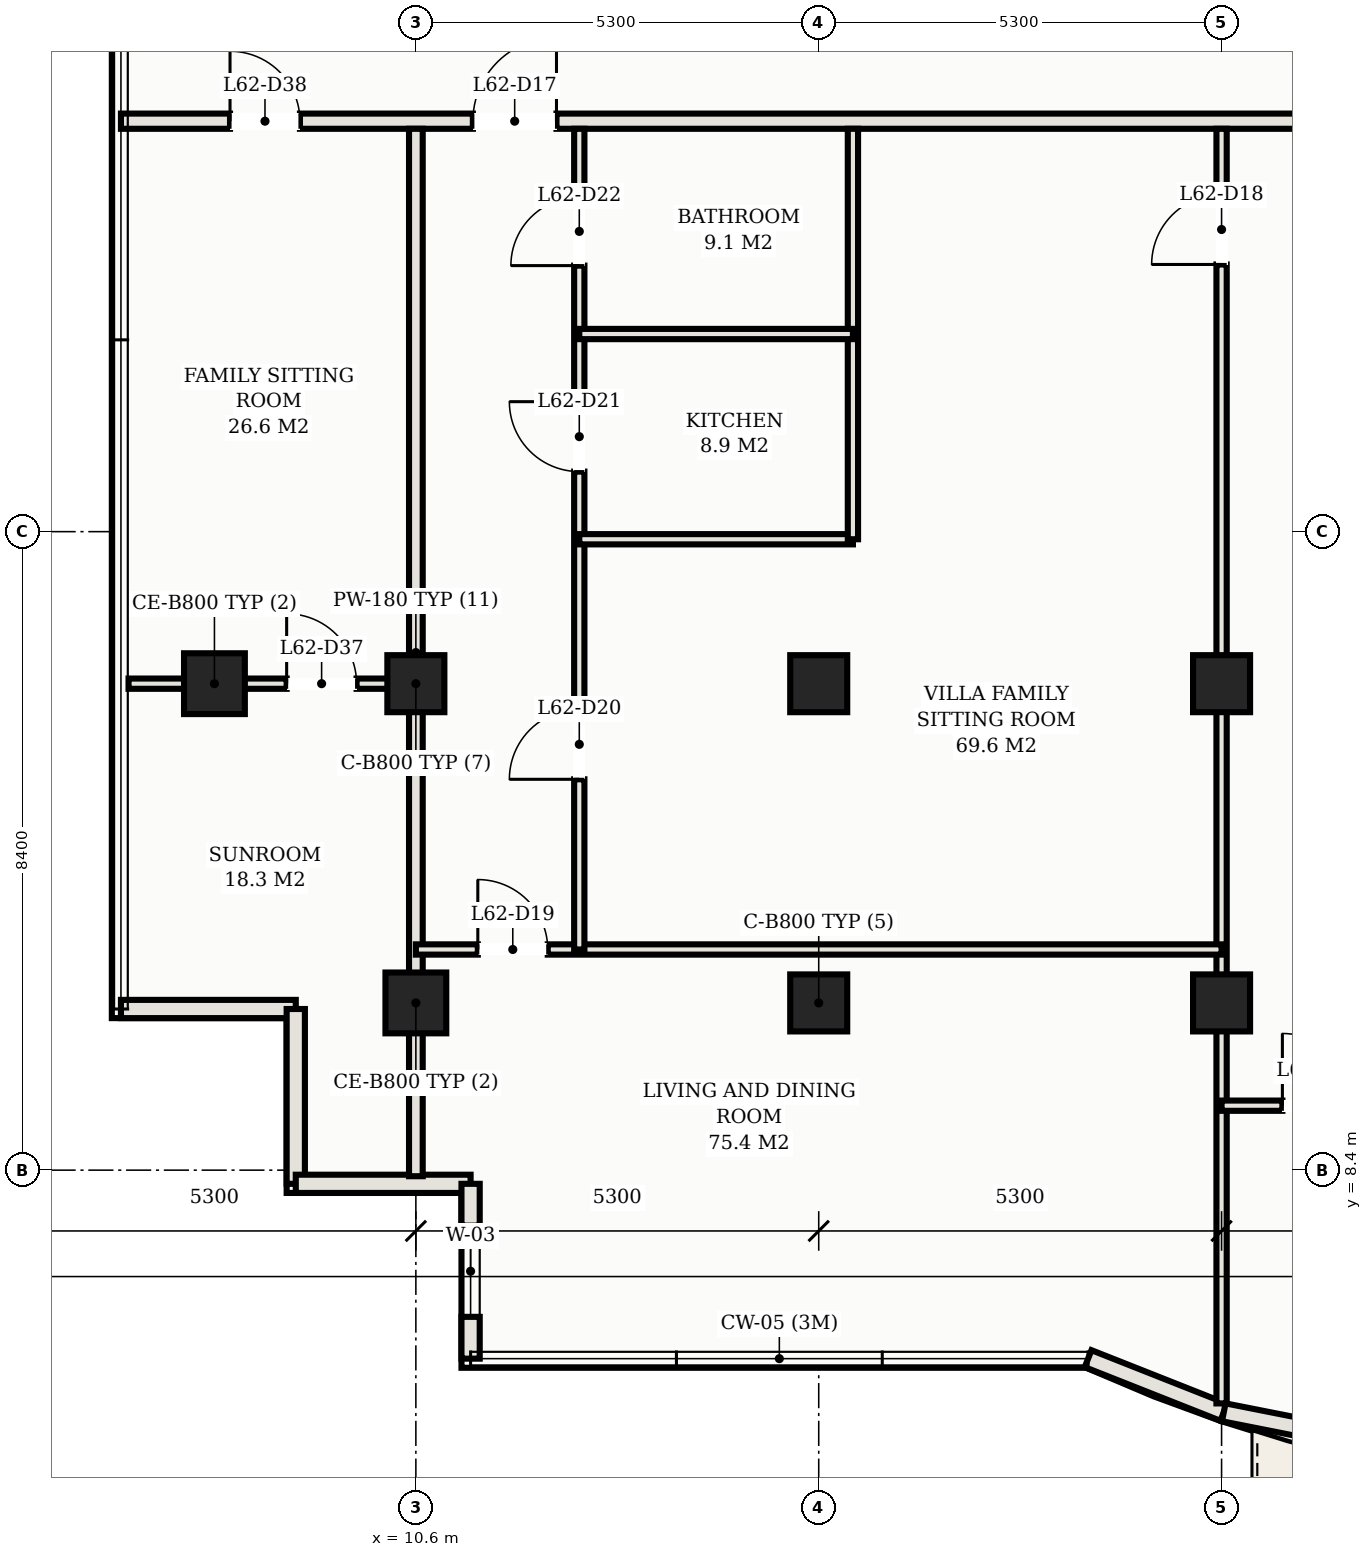
"""IFC4 building model, lengths in metres.
Left out: names, types, materials, properties, quantities, classifications, styles, units other than length and angle.
Written with IfcOpenShell. Run it as: python <this file> out.ifc"""

import sys

from ifc_helpers import new_model, si_unit, direction, frame, frame_2d, origin, origin_2d, place, context, subcontext, project, spatial, rectangle, hollow_rectangle, extrude, element, fill, save


model = new_model("IFC4")
c1 = context("Model", 3, precision=1e-05, world=origin(), true_north=direction((0.0, 1.0)))
c2 = subcontext(c1, "Body", "Model", "MODEL_VIEW")
j1 = project(units=[si_unit("LENGTHUNIT", "METRE"), si_unit("PLANEANGLEUNIT", "RADIAN")], contexts=[c1])
p1 = place(None, origin())
s1 = spatial("IfcSite", under=j1, at=p1, CompositionType="ELEMENT")
p2 = place(p1, origin())
s2 = spatial("IfcBuilding", under=s1, at=p2, CompositionType="ELEMENT")
p3 = place(p2, frame((0.0, 0.0, 226.4)))
s3 = spatial("IfcBuildingStorey", under=s2, at=p3, CompositionType="ELEMENT", Elevation=226.4)
p4 = place(p3, frame((10.6, 14.8, 0.0), z_axis=(0.0, 0.0, 1.0), x_axis=(1.0, 0.0, 0.0)))
e1 = element("IfcColumn", 1, at=p4, inside=s3, PredefinedType="COLUMN", context=c2, shape_type="SweptSolid", body=[
    extrude(hollow_rectangle(XDim=0.75, YDim=0.75, WallThickness=0.025, at=origin_2d()), origin(), (0.0, 0.0, 1.0), 3.3),
])
p5 = place(p3, frame((10.6, 10.6, 0.0), z_axis=(0.0, 0.0, 1.0), x_axis=(1.0, 0.0, 0.0)))
e2 = element("IfcColumn", 2, at=p5, inside=s3, PredefinedType="COLUMN", context=c2, shape_type="SweptSolid", body=[
    extrude(hollow_rectangle(XDim=0.8, YDim=0.8, WallThickness=0.028, at=origin_2d()), origin(), (0.0, 0.0, 1.0), 3.3),
])
for number, where, z_axis, x_axis in (
    (3, (15.9, 14.8, 0.0), (0.0, 0.0, 1.0), (1.0, 0.0, 0.0)),
    (4, (15.9, 10.6, 0.0), (0.0, 0.0, 1.0), (1.0, 0.0, 0.0)),
    (5, (21.2, 14.8, 0.0), (0.0, 0.0, 1.0), (1.0, 0.0, 0.0)),
    (6, (21.2, 10.6, 0.0), (0.0, 0.0, 1.0), (1.0, 0.0, 0.0)),
):
    element("IfcColumn", number, at=place(p3, frame(where, z_axis=z_axis, x_axis=x_axis)), inside=s3, PredefinedType="COLUMN", context=c2, shape_type="SweptSolid", body=[
        extrude(hollow_rectangle(XDim=0.75, YDim=0.75, WallThickness=0.025, at=origin_2d()), origin(), (0.0, 0.0, 1.0), 3.3),
    ])
p6 = place(p3, frame((7.95, 14.8, 0.0), z_axis=(0.0, 0.0, 1.0), x_axis=(1.0, 0.0, 0.0)))
e7 = element("IfcColumn", 7, at=p6, inside=s3, PredefinedType="COLUMN", context=c2, shape_type="SweptSolid", body=[
    extrude(hollow_rectangle(XDim=0.8, YDim=0.8, WallThickness=0.028, at=origin_2d()), origin(), (0.0, 0.0, 1.0), 3.3),
])
for number, where, z_axis, x_axis in (
    (8, (6.72, 10.52, 0.0), (0.0, 0.0, 1.0), (1.0, 0.0, 0.0)),
    (9, (9.02, 10.52, 0.0), (0.0, 0.0, 1.0), (0.0, -1.0, 0.0)),
    (10, (9.02, 8.22, 0.0), (0.0, 0.0, 1.0), (1.0, 0.0, 0.0)),
):
    element("IfcWall", number, at=place(p3, frame(where, z_axis=z_axis, x_axis=x_axis)), inside=s3, PredefinedType="SOLIDWALL", context=c2, shape_type="SweptSolid", body=[
        extrude(rectangle(XDim=2.3, YDim=0.24, at=frame_2d((1.15, 0.0))), origin(), (0.0, 0.0, 1.0), 3.11),
    ])
p7 = place(p3, frame((11.32, 8.22, 0.0), z_axis=(0.0, 0.0, 1.0), x_axis=(0.0, -1.0, 0.0)))
e11 = element("IfcWall", 11, at=p7, inside=s3, PredefinedType="SOLIDWALL", context=c2, shape_type="SweptSolid", body=[
    extrude(rectangle(XDim=2.3, YDim=0.24, at=frame_2d((1.15, 0.0))), origin(), (0.0, 0.0, 1.0), 3.11),
])
p8 = place(p7, frame((0.55, 0.0, 0.75)))
e12 = element("IfcOpeningElement", 12, at=p8, cuts=e11, PredefinedType="OPENING", context=c2, shape_type="SweptSolid", body=[
    extrude(rectangle(XDim=1.2, YDim=1.5, at=frame_2d((0.6, 0.75))), frame((0.0, 0.13, 0.0), z_axis=(0.0, -1.0, 0.0), x_axis=(1.0, 0.0, 0.0)), (0.0, 0.0, 1.0), 0.26),
])
p9 = place(p3, frame((19.444, 5.92, 0.0), z_axis=(0.0, 0.0, 1.0), x_axis=(0.92993442177, -0.367725401906, 0.0)))
e13 = element("IfcWall", 13, at=p9, inside=s3, PredefinedType="SOLIDWALL", context=c2, shape_type="SweptSolid", body=[
    extrude(rectangle(XDim=1.919, YDim=0.24, at=frame_2d((0.96, 0.0))), origin(), (0.0, 0.0, 1.0), 3.11),
])
p10 = place(p3, frame((21.229, 5.214, 0.0), z_axis=(0.0, 0.0, 1.0), x_axis=(0.980985349685, -0.194081796425, 0.0)))
e14 = element("IfcWall", 14, at=p10, inside=s3, PredefinedType="SOLIDWALL", context=c2, shape_type="SweptSolid", body=[
    extrude(rectangle(XDim=4.478, YDim=0.24, at=frame_2d((2.239, 0.0))), origin(), (0.0, 0.0, 1.0), 3.11),
])
p11 = place(p10, frame((1.473, 0.0, 0.0)))
e15 = element("IfcOpeningElement", 15, at=p11, cuts=e14, PredefinedType="OPENING", context=c2, shape_type="SweptSolid", body=[
    extrude(rectangle(XDim=1.8, YDim=2.2, at=frame_2d((0.9, 1.1))), frame((0.0, 0.13, 0.0), z_axis=(0.0, -1.0, 0.0), x_axis=(1.0, 0.0, 0.0)), (0.0, 0.0, 1.0), 0.26),
])
p12 = place(p3, frame((6.72, 22.2, 0.0), z_axis=(0.0, 0.0, 1.0), x_axis=(1.0, 0.0, 0.0)))
e16 = element("IfcWall", 16, at=p12, inside=s3, PredefinedType="PARTITIONING", context=c2, shape_type="SweptSolid", body=[
    extrude(rectangle(XDim=39.56, YDim=0.2, at=frame_2d((19.78, 0.0))), origin(), (0.0, 0.0, 1.0), 2.43),
])
p13 = place(p12, frame((4.63, 0.0, 0.0)))
e17 = element("IfcOpeningElement", 17, at=p13, cuts=e16, PredefinedType="OPENING", context=c2, shape_type="SweptSolid", body=[
    extrude(rectangle(XDim=1.1, YDim=2.25, at=frame_2d((0.55, 1.125))), frame((0.0, 0.11, 0.0), z_axis=(0.0, -1.0, 0.0), x_axis=(1.0, 0.0, 0.0)), (0.0, 0.0, 1.0), 0.22),
])
p14 = place(p12, frame((20.53, 0.0, 0.0)))
e18 = element("IfcOpeningElement", 18, at=p14, cuts=e16, PredefinedType="OPENING", context=c2, shape_type="SweptSolid", body=[
    extrude(rectangle(XDim=1.1, YDim=2.25, at=frame_2d((0.55, 1.125))), frame((0.0, 0.11, 0.0), z_axis=(0.0, -1.0, 0.0), x_axis=(1.0, 0.0, 0.0)), (0.0, 0.0, 1.0), 0.22),
])
p15 = place(p12, frame((1.435, 0.0, 0.0)))
e19 = element("IfcOpeningElement", 19, at=p15, cuts=e16, PredefinedType="OPENING", context=c2, shape_type="SweptSolid", body=[
    extrude(rectangle(XDim=0.92, YDim=2.15, at=frame_2d((0.46, 1.075))), frame((0.0, 0.11, 0.0), z_axis=(0.0, -1.0, 0.0), x_axis=(1.0, 0.0, 0.0)), (0.0, 0.0, 1.0), 0.22),
])
p16 = place(p12, frame((37.205, 0.0, 0.0)))
e20 = element("IfcOpeningElement", 20, at=p16, cuts=e16, PredefinedType="OPENING", context=c2, shape_type="SweptSolid", body=[
    extrude(rectangle(XDim=0.92, YDim=2.15, at=frame_2d((0.46, 1.075))), frame((0.0, 0.11, 0.0), z_axis=(0.0, -1.0, 0.0), x_axis=(1.0, 0.0, 0.0)), (0.0, 0.0, 1.0), 0.22),
])
p17 = place(p3, frame((10.6, 8.32, 0.0), z_axis=(0.0, 0.0, 1.0), x_axis=(0.0, 1.0, 0.0)))
e21 = element("IfcWall", 21, at=p17, inside=s3, PredefinedType="PARTITIONING", context=c2, shape_type="SweptSolid", body=[
    extrude(rectangle(XDim=13.78, YDim=0.18, at=frame_2d((6.89, 0.0))), origin(), (0.0, 0.0, 1.0), 2.43),
])
p18 = place(p3, frame((21.2, 5.331, 0.0), z_axis=(0.0, 0.0, 1.0), x_axis=(0.0, 1.0, 0.0)))
e22 = element("IfcWall", 22, at=p18, inside=s3, PredefinedType="PARTITIONING", context=c2, shape_type="SweptSolid", body=[
    extrude(rectangle(XDim=16.769, YDim=0.135, at=frame_2d((8.385, 0.0))), origin(), (0.0, 0.0, 1.0), 2.43),
])
p19 = place(p18, frame((14.984, 0.0, 0.0)))
e23 = element("IfcOpeningElement", 23, at=p19, cuts=e22, PredefinedType="OPENING", context=c2, shape_type="SweptSolid", body=[
    extrude(rectangle(XDim=0.92, YDim=2.15, at=frame_2d((0.46, 1.075))), frame((0.0, 0.078, 0.0), z_axis=(0.0, -1.0, 0.0), x_axis=(1.0, 0.0, 0.0)), (0.0, 0.0, 1.0), 0.155),
])
p20 = place(p3, frame((10.6, 11.303, 0.0), z_axis=(0.0, 0.0, 1.0), x_axis=(1.0, 0.0, 0.0)))
e24 = element("IfcWall", 24, at=p20, inside=s3, PredefinedType="PARTITIONING", context=c2, shape_type="SweptSolid", body=[
    extrude(rectangle(XDim=10.6, YDim=0.135, at=frame_2d((5.3, 0.0))), origin(), (0.0, 0.0, 1.0), 2.43),
])
p21 = place(p20, frame((0.815, 0.0, 0.0)))
e25 = element("IfcOpeningElement", 25, at=p21, cuts=e24, PredefinedType="OPENING", context=c2, shape_type="SweptSolid", body=[
    extrude(rectangle(XDim=0.92, YDim=2.15, at=frame_2d((0.46, 1.075))), frame((0.0, 0.078, 0.0), z_axis=(0.0, -1.0, 0.0), x_axis=(1.0, 0.0, 0.0)), (0.0, 0.0, 1.0), 0.155),
])
p22 = place(p3, frame((12.75, 11.303, 0.0), z_axis=(0.0, 0.0, 1.0), x_axis=(0.0, 1.0, 0.0)))
e26 = element("IfcWall", 26, at=p22, inside=s3, PredefinedType="PARTITIONING", context=c2, shape_type="SweptSolid", body=[
    extrude(rectangle(XDim=10.797, YDim=0.135, at=frame_2d((5.398, 0.0))), origin(), (0.0, 0.0, 1.0), 2.43),
])
p23 = place(p22, frame((2.239, 0.0, 0.0)))
e27 = element("IfcOpeningElement", 27, at=p23, cuts=e26, PredefinedType="OPENING", context=c2, shape_type="SweptSolid", body=[
    extrude(rectangle(XDim=0.92, YDim=2.15, at=frame_2d((0.46, 1.075))), frame((0.0, 0.078, 0.0), z_axis=(0.0, -1.0, 0.0), x_axis=(1.0, 0.0, 0.0)), (0.0, 0.0, 1.0), 0.155),
])
p24 = place(p22, frame((6.287, 0.0, 0.0)))
e28 = element("IfcOpeningElement", 28, at=p24, cuts=e26, PredefinedType="OPENING", context=c2, shape_type="SweptSolid", body=[
    extrude(rectangle(XDim=0.92, YDim=2.15, at=frame_2d((0.46, 1.075))), frame((0.0, 0.078, 0.0), z_axis=(0.0, -1.0, 0.0), x_axis=(1.0, 0.0, 0.0)), (0.0, 0.0, 1.0), 0.155),
])
p25 = place(p22, frame((8.997, 0.0, 0.0)))
e29 = element("IfcOpeningElement", 29, at=p25, cuts=e26, PredefinedType="OPENING", context=c2, shape_type="SweptSolid", body=[
    extrude(rectangle(XDim=0.9, YDim=2.15, at=frame_2d((0.45, 1.075))), frame((0.0, 0.078, 0.0), z_axis=(0.0, -1.0, 0.0), x_axis=(1.0, 0.0, 0.0)), (0.0, 0.0, 1.0), 0.155),
])
p26 = place(p3, frame((12.75, 16.7, 0.0), z_axis=(0.0, 0.0, 1.0), x_axis=(1.0, 0.0, 0.0)))
e30 = element("IfcWall", 30, at=p26, inside=s3, PredefinedType="PARTITIONING", context=c2, shape_type="SweptSolid", body=[
    extrude(rectangle(XDim=3.6, YDim=0.135, at=frame_2d((1.8, 0.0))), origin(), (0.0, 0.0, 1.0), 2.43),
])
p27 = place(p3, frame((16.35, 16.7, 0.0), z_axis=(0.0, 0.0, 1.0), x_axis=(0.0, 1.0, 0.0)))
e31 = element("IfcWall", 31, at=p27, inside=s3, PredefinedType="PARTITIONING", context=c2, shape_type="SweptSolid", body=[
    extrude(rectangle(XDim=5.4, YDim=0.135, at=frame_2d((2.7, 0.0))), origin(), (0.0, 0.0, 1.0), 2.43),
])
p28 = place(p3, frame((12.75, 19.4, 0.0), z_axis=(0.0, 0.0, 1.0), x_axis=(1.0, 0.0, 0.0)))
e32 = element("IfcWall", 32, at=p28, inside=s3, PredefinedType="PARTITIONING", context=c2, shape_type="SweptSolid", body=[
    extrude(rectangle(XDim=3.6, YDim=0.135, at=frame_2d((1.8, 0.0))), origin(), (0.0, 0.0, 1.0), 2.43),
])
p29 = place(p3, frame((21.2, 9.248, 0.0), z_axis=(0.0, 0.0, 1.0), x_axis=(1.0, 0.0, 0.0)))
e33 = element("IfcWall", 33, at=p29, inside=s3, PredefinedType="PARTITIONING", context=c2, shape_type="SweptSolid", body=[
    extrude(rectangle(XDim=5.3, YDim=0.135, at=frame_2d((2.65, 0.0))), origin(), (0.0, 0.0, 1.0), 2.43),
])
p30 = place(p29, frame((0.8, 0.0, 0.0)))
e34 = element("IfcOpeningElement", 34, at=p30, cuts=e33, PredefinedType="OPENING", context=c2, shape_type="SweptSolid", body=[
    extrude(rectangle(XDim=0.95, YDim=2.15, at=frame_2d((0.475, 1.075))), frame((0.0, 0.078, 0.0), z_axis=(0.0, -1.0, 0.0), x_axis=(1.0, 0.0, 0.0)), (0.0, 0.0, 1.0), 0.155),
])
p31 = place(p29, frame((3.275, 0.0, 0.0)))
e35 = element("IfcOpeningElement", 35, at=p31, cuts=e33, PredefinedType="OPENING", context=c2, shape_type="SweptSolid", body=[
    extrude(rectangle(XDim=0.9, YDim=2.15, at=frame_2d((0.45, 1.075))), frame((0.0, 0.078, 0.0), z_axis=(0.0, -1.0, 0.0), x_axis=(1.0, 0.0, 0.0)), (0.0, 0.0, 1.0), 0.155),
])
p32 = place(p3, frame((6.82, 14.8, 0.0), z_axis=(0.0, 0.0, 1.0), x_axis=(1.0, 0.0, 0.0)))
e36 = element("IfcWall", 36, at=p32, inside=s3, PredefinedType="PARTITIONING", context=c2, shape_type="SweptSolid", body=[
    extrude(rectangle(XDim=3.78, YDim=0.135, at=frame_2d((1.89, 0.0))), origin(), (0.0, 0.0, 1.0), 2.43),
])
p33 = place(p32, frame((2.08, 0.0, 0.0)))
e37 = element("IfcOpeningElement", 37, at=p33, cuts=e36, PredefinedType="OPENING", context=c2, shape_type="SweptSolid", body=[
    extrude(rectangle(XDim=0.92, YDim=2.15, at=frame_2d((0.46, 1.075))), frame((0.0, 0.078, 0.0), z_axis=(0.0, -1.0, 0.0), x_axis=(1.0, 0.0, 0.0)), (0.0, 0.0, 1.0), 0.155),
])
p34 = place(p8, origin())
e38 = element("IfcWindow", 38, at=p34, inside=s3, PartitioningType="SINGLE_PANEL", PredefinedType="WINDOW", context=c2, shape_type="SweptSolid", body=[
    extrude(rectangle(XDim=1.2, YDim=1.5, at=frame_2d((0.6, 0.75))), frame((0.0, 0.03, 0.0), z_axis=(0.0, -1.0, 0.0), x_axis=(1.0, 0.0, 0.0)), (0.0, 0.0, 1.0), 0.06),
])
fill(e12, e38)
p35 = place(p13, origin())
e39 = element("IfcDoor", 39, at=p35, inside=s3, OperationType="SINGLE_SWING_RIGHT", PredefinedType="DOOR", context=c2, shape_type="SweptSolid", body=[
    extrude(rectangle(XDim=1.1, YDim=2.25, at=frame_2d((0.55, 1.125))), frame((0.0, 0.025, 0.0), z_axis=(0.0, -1.0, 0.0), x_axis=(1.0, 0.0, 0.0)), (0.0, 0.0, 1.0), 0.05),
])
fill(e17, e39)
p36 = place(p19, origin())
e40 = element("IfcDoor", 40, at=p36, inside=s3, OperationType="SINGLE_SWING_LEFT", PredefinedType="DOOR", context=c2, shape_type="SweptSolid", body=[
    extrude(rectangle(XDim=0.92, YDim=2.15, at=frame_2d((0.46, 1.075))), frame((0.0, 0.025, 0.0), z_axis=(0.0, -1.0, 0.0), x_axis=(1.0, 0.0, 0.0)), (0.0, 0.0, 1.0), 0.05),
])
fill(e23, e40)
p37 = place(p21, origin())
e41 = element("IfcDoor", 41, at=p37, inside=s3, OperationType="SINGLE_SWING_LEFT", PredefinedType="DOOR", context=c2, shape_type="SweptSolid", body=[
    extrude(rectangle(XDim=0.92, YDim=2.15, at=frame_2d((0.46, 1.075))), frame((0.0, 0.025, 0.0), z_axis=(0.0, -1.0, 0.0), x_axis=(1.0, 0.0, 0.0)), (0.0, 0.0, 1.0), 0.05),
])
fill(e25, e41)
p38 = place(p23, origin())
e42 = element("IfcDoor", 42, at=p38, inside=s3, OperationType="SINGLE_SWING_LEFT", PredefinedType="DOOR", context=c2, shape_type="SweptSolid", body=[
    extrude(rectangle(XDim=0.92, YDim=2.15, at=frame_2d((0.46, 1.075))), frame((0.0, 0.025, 0.0), z_axis=(0.0, -1.0, 0.0), x_axis=(1.0, 0.0, 0.0)), (0.0, 0.0, 1.0), 0.05),
])
fill(e27, e42)
p39 = place(p24, origin())
e43 = element("IfcDoor", 43, at=p39, inside=s3, OperationType="SINGLE_SWING_RIGHT", PredefinedType="DOOR", context=c2, shape_type="SweptSolid", body=[
    extrude(rectangle(XDim=0.92, YDim=2.15, at=frame_2d((0.46, 1.075))), frame((0.0, 0.025, 0.0), z_axis=(0.0, -1.0, 0.0), x_axis=(1.0, 0.0, 0.0)), (0.0, 0.0, 1.0), 0.05),
])
fill(e28, e43)
p40 = place(p25, origin())
e44 = element("IfcDoor", 44, at=p40, inside=s3, OperationType="SINGLE_SWING_LEFT", PredefinedType="DOOR", context=c2, shape_type="SweptSolid", body=[
    extrude(rectangle(XDim=0.9, YDim=2.15, at=frame_2d((0.45, 1.075))), frame((0.0, 0.025, 0.0), z_axis=(0.0, -1.0, 0.0), x_axis=(1.0, 0.0, 0.0)), (0.0, 0.0, 1.0), 0.05),
])
fill(e29, e44)
p41 = place(p30, origin())
e45 = element("IfcDoor", 45, at=p41, inside=s3, OperationType="SINGLE_SWING_LEFT", PredefinedType="DOOR", context=c2, shape_type="SweptSolid", body=[
    extrude(rectangle(XDim=0.95, YDim=2.15, at=frame_2d((0.475, 1.075))), frame((0.0, 0.025, 0.0), z_axis=(0.0, -1.0, 0.0), x_axis=(1.0, 0.0, 0.0)), (0.0, 0.0, 1.0), 0.05),
])
fill(e34, e45)
p42 = place(p33, origin())
e46 = element("IfcDoor", 46, at=p42, inside=s3, OperationType="SINGLE_SWING_LEFT", PredefinedType="DOOR", context=c2, shape_type="SweptSolid", body=[
    extrude(rectangle(XDim=0.92, YDim=2.15, at=frame_2d((0.46, 1.075))), frame((0.0, 0.025, 0.0), z_axis=(0.0, -1.0, 0.0), x_axis=(1.0, 0.0, 0.0)), (0.0, 0.0, 1.0), 0.05),
])
fill(e37, e46)
p43 = place(p15, origin())
e47 = element("IfcDoor", 47, at=p43, inside=s3, OperationType="SINGLE_SWING_LEFT", PredefinedType="DOOR", context=c2, shape_type="SweptSolid", body=[
    extrude(rectangle(XDim=0.92, YDim=2.15, at=frame_2d((0.46, 1.075))), frame((0.0, 0.025, 0.0), z_axis=(0.0, -1.0, 0.0), x_axis=(1.0, 0.0, 0.0)), (0.0, 0.0, 1.0), 0.05),
])
fill(e19, e47)
save(model, sys.argv[1])
